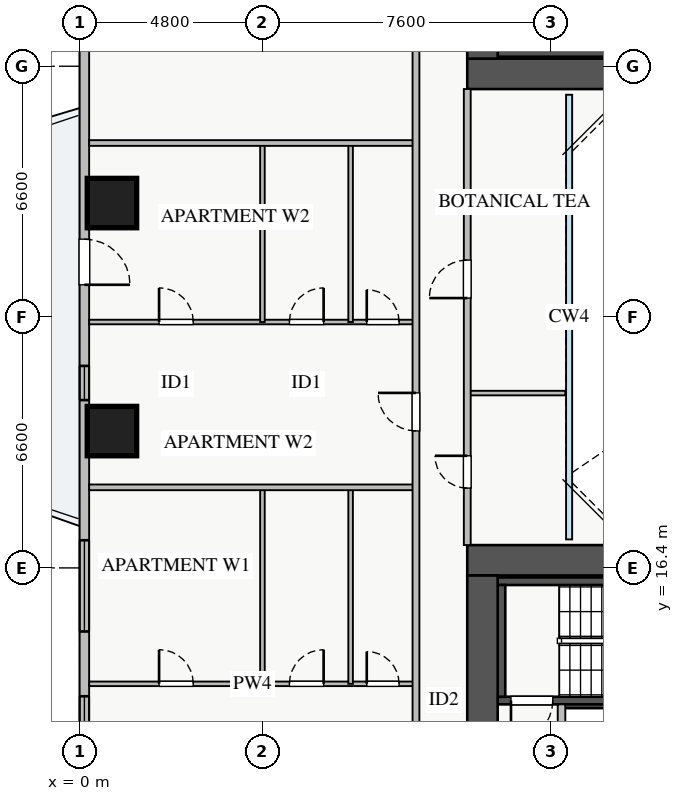
"""IFC4 building model, lengths in metres.
Left out: names, types, materials, properties, quantities, classifications, styles, units other than length and angle.
Written with IfcOpenShell. Run it as: python <this file> out.ifc"""

import sys

from ifc_helpers import new_model, si_unit, direction, frame, frame_2d, origin, origin_2d, place, context, subcontext, project, spatial, rectangle, extrude, source, transform, mapped, element, fill, save


model = new_model("IFC4")
c1 = context("Model", 3, precision=1e-05, world=origin(), true_north=direction((0.0, 1.0)))
c2 = subcontext(c1, "Body", "Model", "MODEL_VIEW")
j1 = project(units=[si_unit("LENGTHUNIT", "METRE"), si_unit("PLANEANGLEUNIT", "RADIAN")], contexts=[c1])
p1 = place(None, origin())
s1 = spatial("IfcSite", under=j1, at=p1, CompositionType="ELEMENT")
p2 = place(p1, origin())
s2 = spatial("IfcBuilding", under=s1, at=p2, CompositionType="ELEMENT")
p3 = place(p2, frame((0.0, 0.0, 32.75)))
s3 = spatial("IfcBuildingStorey", under=s2, at=p3, CompositionType="ELEMENT", Elevation=32.75)
p4 = place(p3, frame((12.68, 12.8, 0.0), z_axis=(0.0, 0.0, 1.0), x_axis=(1.0, 0.0, 0.0)))
e1 = element("IfcWall", 1, at=p4, inside=s3, PredefinedType="SHEAR", context=c2, shape_type="SweptSolid", body=[
    extrude(rectangle(XDim=1.94, YDim=0.18, at=frame_2d((0.97, 0.0))), origin(), (0.0, 0.0, 1.0), 3.07),
])
p5 = place(p3, frame((11.0, 29.95, 0.0), z_axis=(0.0, 0.0, 1.0), x_axis=(1.0, 0.0, 0.0)))
e2 = element("IfcWall", 2, at=p5, inside=s3, PredefinedType="SHEAR", context=c2, shape_type="SweptSolid", body=[
    extrude(rectangle(XDim=7.15, YDim=0.2, at=frame_2d((3.575, 0.0))), origin(), (0.0, 0.0, 1.0), 3.25),
])
p6 = place(p3, frame((11.0, 12.91, 0.0), z_axis=(0.0, 0.0, 1.0), x_axis=(1.0, 0.0, 0.0)))
e3 = element("IfcWall", 3, at=p6, inside=s3, PredefinedType="SHEAR", context=c2, shape_type="SweptSolid", body=[
    extrude(rectangle(XDim=7.15, YDim=0.2, at=frame_2d((3.575, 0.0))), origin(), (0.0, 0.0, 1.0), 3.25),
])
p7 = place(p6, frame((0.35, 0.0, 0.0)))
e4 = element("IfcOpeningElement", 4, at=p7, cuts=e3, PredefinedType="OPENING", context=c2, shape_type="SweptSolid", body=[
    extrude(rectangle(XDim=1.1, YDim=2.05, at=frame_2d((0.55, 1.025))), frame((0.0, 0.11, 0.0), z_axis=(0.0, -1.0, 0.0), x_axis=(1.0, 0.0, 0.0)), (0.0, 0.0, 1.0), 0.22),
])
p8 = place(p3, frame((11.0, 16.05, 0.0), z_axis=(0.0, 0.0, 1.0), x_axis=(1.0, 0.0, 0.0)))
e5 = element("IfcWall", 5, at=p8, inside=s3, PredefinedType="SHEAR", context=c2, shape_type="SweptSolid", body=[
    extrude(rectangle(XDim=7.15, YDim=0.2, at=frame_2d((3.575, 0.0))), origin(), (0.0, 0.0, 1.0), 3.25),
])
p9 = place(p3, frame((11.1, 13.01, 0.0), z_axis=(0.0, 0.0, 1.0), x_axis=(0.0, 1.0, 0.0)))
e6 = element("IfcWall", 6, at=p9, inside=s3, PredefinedType="SHEAR", context=c2, shape_type="SweptSolid", body=[
    extrude(rectangle(XDim=2.94, YDim=0.2, at=frame_2d((1.47, 0.0))), origin(), (0.0, 0.0, 1.0), 3.25),
])
p10 = place(p3, frame((10.2, 29.4, 0.0), z_axis=(0.0, 0.0, 1.0), x_axis=(1.0, 0.0, 0.0)))
e7 = element("IfcWall", 7, at=p10, inside=s3, PredefinedType="SHEAR", context=c2, shape_type="SweptSolid", body=[
    extrude(rectangle(XDim=17.6, YDim=0.8, at=frame_2d((8.8, 0.0))), origin(), (0.0, 0.0, 1.0), 3.25),
])
p11 = place(p3, frame((10.6, 29.8, 0.0), z_axis=(0.0, 0.0, 1.0), x_axis=(0.0, 1.0, 0.0)))
e8 = element("IfcWall", 8, at=p11, inside=s3, PredefinedType="SHEAR", context=c2, shape_type="SweptSolid", body=[
    extrude(rectangle(XDim=5.6, YDim=0.8, at=frame_2d((2.8, 0.0))), origin(), (0.0, 0.0, 1.0), 3.25),
])
p12 = place(p3, frame((10.2, 16.6, 0.0), z_axis=(0.0, 0.0, 1.0), x_axis=(1.0, 0.0, 0.0)))
e9 = element("IfcWall", 9, at=p12, inside=s3, PredefinedType="SHEAR", context=c2, shape_type="SweptSolid", body=[
    extrude(rectangle(XDim=17.6, YDim=0.8, at=frame_2d((8.8, 0.0))), origin(), (0.0, 0.0, 1.0), 3.25),
])
p13 = place(p3, frame((10.6, 10.6, 0.0), z_axis=(0.0, 0.0, 1.0), x_axis=(0.0, 1.0, 0.0)))
e10 = element("IfcWall", 10, at=p13, inside=s3, PredefinedType="SHEAR", context=c2, shape_type="SweptSolid", body=[
    extrude(rectangle(XDim=5.6, YDim=0.8, at=frame_2d((2.8, 0.0))), origin(), (0.0, 0.0, 1.0), 3.25),
])
m1 = source(origin(), c2, "Body", "SweptSolid", [
    extrude(rectangle(XDim=1.3, YDim=1.3, at=origin_2d()), origin(), (0.0, 0.0, 1.0), 3.25),
])
for number, where, z_axis, x_axis in (
    (11, (0.85, 26.0, 0.0), (0.0, 0.0, 1.0), (1.0, 0.0, 0.0)),
    (12, (0.85, 20.0, 0.0), (0.0, 0.0, 1.0), (1.0, 0.0, 0.0)),
):
    element("IfcColumn", number, at=place(p3, frame(where, z_axis=z_axis, x_axis=x_axis)), inside=s3, PredefinedType="COLUMN", context=c2, shape_type="MappedRepresentation", body=[
        mapped(m1, transform((0.0, 0.0, 0.0), x_axis=(1.0, 0.0, 0.0), y_axis=(0.0, 1.0, 0.0), z_axis=(0.0, 0.0, 1.0), scale=1.0)),
    ])
p14 = place(p3, frame((0.125, 9.45, 0.0), z_axis=(0.0, 0.0, 1.0), x_axis=(0.0, 1.0, 0.0)))
e13 = element("IfcWall", 13, at=p14, inside=s3, PredefinedType="STANDARD", context=c2, shape_type="SweptSolid", body=[
    extrude(rectangle(XDim=27.1, YDim=0.25, at=frame_2d((13.55, 0.0))), origin(), (0.0, 0.0, 1.0), 2.61),
])
p15 = place(p14, frame((14.4, 0.0, 0.0)))
e14 = element("IfcOpeningElement", 14, at=p15, cuts=e13, PredefinedType="OPENING", context=c2, shape_type="SweptSolid", body=[
    extrude(rectangle(XDim=1.2, YDim=2.1, at=frame_2d((0.6, 1.05))), frame((0.0, 0.135, 0.0), z_axis=(0.0, -1.0, 0.0), x_axis=(1.0, 0.0, 0.0)), (0.0, 0.0, 1.0), 0.27),
])
p16 = place(p14, frame((1.472, 0.0, 0.9)))
e15 = element("IfcOpeningElement", 15, at=p16, cuts=e13, PredefinedType="OPENING", context=c2, shape_type="SweptSolid", body=[
    extrude(rectangle(XDim=2.1, YDim=1.5, at=frame_2d((1.05, 0.75))), frame((0.0, 0.135, 0.0), z_axis=(0.0, -1.0, 0.0), x_axis=(1.0, 0.0, 0.0)), (0.0, 0.0, 1.0), 0.27),
])
p17 = place(p14, frame((22.663, 0.0, 0.9)))
e16 = element("IfcOpeningElement", 16, at=p17, cuts=e13, PredefinedType="OPENING", context=c2, shape_type="SweptSolid", body=[
    extrude(rectangle(XDim=2.1, YDim=1.48, at=frame_2d((1.05, 0.74))), frame((0.0, 0.135, 0.0), z_axis=(0.0, -1.0, 0.0), x_axis=(1.0, 0.0, 0.0)), (0.0, 0.0, 1.0), 0.27),
])
p18 = place(p14, frame((5.278, 0.0, 0.9)))
e17 = element("IfcOpeningElement", 17, at=p18, cuts=e13, PredefinedType="OPENING", context=c2, shape_type="SweptSolid", body=[
    extrude(rectangle(XDim=2.4, YDim=1.5, at=frame_2d((1.2, 0.75))), frame((0.0, 0.135, 0.0), z_axis=(0.0, -1.0, 0.0), x_axis=(1.0, 0.0, 0.0)), (0.0, 0.0, 1.0), 0.27),
])
p19 = place(p14, frame((11.365, 0.0, 0.9)))
e18 = element("IfcOpeningElement", 18, at=p19, cuts=e13, PredefinedType="OPENING", context=c2, shape_type="SweptSolid", body=[
    extrude(rectangle(XDim=0.9, YDim=1.2, at=frame_2d((0.45, 0.6))), frame((0.0, 0.135, 0.0), z_axis=(0.0, -1.0, 0.0), x_axis=(1.0, 0.0, 0.0)), (0.0, 0.0, 1.0), 0.27),
])
p20 = place(p3, frame((12.68, 10.6, 0.0), z_axis=(0.0, 0.0, 1.0), x_axis=(0.0, 1.0, 0.0)))
e19 = element("IfcWall", 19, at=p20, inside=s3, PredefinedType="PARTITIONING", context=c2, shape_type="SweptSolid", body=[
    extrude(rectangle(XDim=2.21, YDim=0.2, at=frame_2d((1.105, 0.0))), origin(), (0.0, 0.0, 1.0), 3.07),
])
p21 = place(p3, frame((0.25, 13.35, 0.0), z_axis=(0.0, 0.0, 1.0), x_axis=(1.0, 0.0, 0.0)))
e20 = element("IfcWall", 20, at=p21, inside=s3, PredefinedType="PLUMBINGWALL", context=c2, shape_type="SweptSolid", body=[
    extrude(rectangle(XDim=8.6, YDim=0.12, at=frame_2d((4.3, 0.0))), origin(), (0.0, 0.0, 1.0), 3.07),
])
p22 = place(p21, frame((1.84, 0.0, 0.0)))
e21 = element("IfcOpeningElement", 21, at=p22, cuts=e20, PredefinedType="OPENING", context=c2, shape_type="SweptSolid", body=[
    extrude(rectangle(XDim=0.9, YDim=2.05, at=frame_2d((0.45, 1.025))), frame((0.0, 0.07, 0.0), z_axis=(0.0, -1.0, 0.0), x_axis=(1.0, 0.0, 0.0)), (0.0, 0.0, 1.0), 0.14),
])
p23 = place(p21, frame((5.27, 0.0, 0.0)))
e22 = element("IfcOpeningElement", 22, at=p23, cuts=e20, PredefinedType="OPENING", context=c2, shape_type="SweptSolid", body=[
    extrude(rectangle(XDim=0.9, YDim=2.05, at=frame_2d((0.45, 1.025))), frame((0.0, 0.07, 0.0), z_axis=(0.0, -1.0, 0.0), x_axis=(1.0, 0.0, 0.0)), (0.0, 0.0, 1.0), 0.14),
])
p24 = place(p21, frame((7.305, 0.0, 0.0)))
e23 = element("IfcOpeningElement", 23, at=p24, cuts=e20, PredefinedType="OPENING", context=c2, shape_type="SweptSolid", body=[
    extrude(rectangle(XDim=0.85, YDim=2.05, at=frame_2d((0.425, 1.025))), frame((0.0, 0.07, 0.0), z_axis=(0.0, -1.0, 0.0), x_axis=(1.0, 0.0, 0.0)), (0.0, 0.0, 1.0), 0.14),
])
for number, where, z_axis, x_axis in (
    (24, (4.81, 13.35, 0.0), (0.0, 0.0, 1.0), (0.0, 1.0, 0.0)),
    (25, (7.13, 13.35, 0.0), (0.0, 0.0, 1.0), (0.0, 1.0, 0.0)),
):
    element("IfcWall", number, at=place(p3, frame(where, z_axis=z_axis, x_axis=x_axis)), inside=s3, PredefinedType="PLUMBINGWALL", context=c2, shape_type="SweptSolid", body=[
        extrude(rectangle(XDim=5.17, YDim=0.12, at=frame_2d((2.585, 0.0))), origin(), (0.0, 0.0, 1.0), 3.07),
    ])
p25 = place(p3, frame((0.25, 22.87, 0.0), z_axis=(0.0, 0.0, 1.0), x_axis=(1.0, 0.0, 0.0)))
e26 = element("IfcWall", 26, at=p25, inside=s3, PredefinedType="PLUMBINGWALL", context=c2, shape_type="SweptSolid", body=[
    extrude(rectangle(XDim=8.6, YDim=0.12, at=frame_2d((4.3, 0.0))), origin(), (0.0, 0.0, 1.0), 3.07),
])
p26 = place(p25, frame((1.84, 0.0, 0.0)))
e27 = element("IfcOpeningElement", 27, at=p26, cuts=e26, PredefinedType="OPENING", context=c2, shape_type="SweptSolid", body=[
    extrude(rectangle(XDim=0.9, YDim=2.05, at=frame_2d((0.45, 1.025))), frame((0.0, 0.07, 0.0), z_axis=(0.0, -1.0, 0.0), x_axis=(1.0, 0.0, 0.0)), (0.0, 0.0, 1.0), 0.14),
])
p27 = place(p25, frame((5.27, 0.0, 0.0)))
e28 = element("IfcOpeningElement", 28, at=p27, cuts=e26, PredefinedType="OPENING", context=c2, shape_type="SweptSolid", body=[
    extrude(rectangle(XDim=0.9, YDim=2.05, at=frame_2d((0.45, 1.025))), frame((0.0, 0.07, 0.0), z_axis=(0.0, -1.0, 0.0), x_axis=(1.0, 0.0, 0.0)), (0.0, 0.0, 1.0), 0.14),
])
p28 = place(p25, frame((7.305, 0.0, 0.0)))
e29 = element("IfcOpeningElement", 29, at=p28, cuts=e26, PredefinedType="OPENING", context=c2, shape_type="SweptSolid", body=[
    extrude(rectangle(XDim=0.85, YDim=2.05, at=frame_2d((0.425, 1.025))), frame((0.0, 0.07, 0.0), z_axis=(0.0, -1.0, 0.0), x_axis=(1.0, 0.0, 0.0)), (0.0, 0.0, 1.0), 0.14),
])
for number, where, z_axis, x_axis in (
    (30, (4.81, 22.87, 0.0), (0.0, 0.0, 1.0), (0.0, 1.0, 0.0)),
    (31, (7.13, 22.87, 0.0), (0.0, 0.0, 1.0), (0.0, 1.0, 0.0)),
):
    element("IfcWall", number, at=place(p3, frame(where, z_axis=z_axis, x_axis=x_axis)), inside=s3, PredefinedType="PLUMBINGWALL", context=c2, shape_type="SweptSolid", body=[
        extrude(rectangle(XDim=4.71, YDim=0.12, at=frame_2d((2.355, 0.0))), origin(), (0.0, 0.0, 1.0), 3.07),
    ])
for number, where, z_axis, x_axis in (
    (32, (0.25, 18.52, 0.0), (0.0, 0.0, 1.0), (1.0, 0.0, 0.0)),
    (33, (0.25, 27.58, 0.0), (0.0, 0.0, 1.0), (1.0, 0.0, 0.0)),
):
    element("IfcWall", number, at=place(p3, frame(where, z_axis=z_axis, x_axis=x_axis)), inside=s3, PredefinedType="PARTITIONING", context=c2, shape_type="SweptSolid", body=[
        extrude(rectangle(XDim=8.6, YDim=0.15, at=frame_2d((4.3, 0.0))), origin(), (0.0, 0.0, 1.0), 3.07),
    ])
p29 = place(p3, frame((8.85, 7.21, 0.0), z_axis=(0.0, 0.0, 1.0), x_axis=(0.0, 1.0, 0.0)))
e34 = element("IfcWall", 34, at=p29, inside=s3, PredefinedType="PARTITIONING", context=c2, shape_type="SweptSolid", body=[
    extrude(rectangle(XDim=31.23, YDim=0.18, at=frame_2d((15.615, 0.0))), origin(), (0.0, 0.0, 1.0), 3.07),
])
p30 = place(p29, frame((30.09, 0.0, 0.0)))
e35 = element("IfcOpeningElement", 35, at=p30, cuts=e34, PredefinedType="OPENING", context=c2, shape_type="SweptSolid", body=[
    extrude(rectangle(XDim=0.9, YDim=2.05, at=frame_2d((0.45, 1.025))), frame((0.0, 0.1, 0.0), z_axis=(0.0, -1.0, 0.0), x_axis=(1.0, 0.0, 0.0)), (0.0, 0.0, 1.0), 0.2),
])
p31 = place(p29, frame((0.24, 0.0, 0.0)))
e36 = element("IfcOpeningElement", 36, at=p31, cuts=e34, PredefinedType="OPENING", context=c2, shape_type="SweptSolid", body=[
    extrude(rectangle(XDim=0.9, YDim=2.05, at=frame_2d((0.45, 1.025))), frame((0.0, 0.1, 0.0), z_axis=(0.0, -1.0, 0.0), x_axis=(1.0, 0.0, 0.0)), (0.0, 0.0, 1.0), 0.2),
])
p32 = place(p29, frame((3.06, 0.0, 0.0)))
e37 = element("IfcOpeningElement", 37, at=p32, cuts=e34, PredefinedType="OPENING", context=c2, shape_type="SweptSolid", body=[
    extrude(rectangle(XDim=1.0, YDim=2.05, at=frame_2d((0.5, 1.025))), frame((0.0, 0.1, 0.0), z_axis=(0.0, -1.0, 0.0), x_axis=(1.0, 0.0, 0.0)), (0.0, 0.0, 1.0), 0.2),
])
p33 = place(p29, frame((12.795, 0.0, 0.0)))
e38 = element("IfcOpeningElement", 38, at=p33, cuts=e34, PredefinedType="OPENING", context=c2, shape_type="SweptSolid", body=[
    extrude(rectangle(XDim=1.0, YDim=2.05, at=frame_2d((0.5, 1.025))), frame((0.0, 0.1, 0.0), z_axis=(0.0, -1.0, 0.0), x_axis=(1.0, 0.0, 0.0)), (0.0, 0.0, 1.0), 0.2),
])
p34 = place(p29, frame((24.62, 0.0, 0.0)))
e39 = element("IfcOpeningElement", 39, at=p34, cuts=e34, PredefinedType="OPENING", context=c2, shape_type="SweptSolid", body=[
    extrude(rectangle(XDim=1.0, YDim=2.05, at=frame_2d((0.5, 1.025))), frame((0.0, 0.1, 0.0), z_axis=(0.0, -1.0, 0.0), x_axis=(1.0, 0.0, 0.0)), (0.0, 0.0, 1.0), 0.2),
])
p35 = place(p3, frame((10.2, 21.0, 0.0), z_axis=(0.0, 0.0, 1.0), x_axis=(1.0, 0.0, 0.0)))
e40 = element("IfcWall", 40, at=p35, inside=s3, PredefinedType="PLUMBINGWALL", context=c2, shape_type="SweptSolid", body=[
    extrude(rectangle(XDim=2.58, YDim=0.12, at=frame_2d((1.29, 0.0))), origin(), (0.0, 0.0, 1.0), 3.07),
])
p36 = place(p3, frame((10.2, 17.0, 0.0), z_axis=(0.0, 0.0, 1.0), x_axis=(0.0, 1.0, 0.0)))
e41 = element("IfcWall", 41, at=p36, inside=s3, PredefinedType="PARTITIONING", context=c2, shape_type="SweptSolid", body=[
    extrude(rectangle(XDim=12.0, YDim=0.18, at=frame_2d((6.0, 0.0))), origin(), (0.0, 0.0, 1.0), 3.07),
])
p37 = place(p36, frame((1.5, 0.0, 0.0)))
e42 = element("IfcOpeningElement", 42, at=p37, cuts=e41, PredefinedType="OPENING", context=c2, shape_type="SweptSolid", body=[
    extrude(rectangle(XDim=0.85, YDim=2.05, at=frame_2d((0.425, 1.025))), frame((0.0, 0.1, 0.0), z_axis=(0.0, -1.0, 0.0), x_axis=(1.0, 0.0, 0.0)), (0.0, 0.0, 1.0), 0.2),
])
p38 = place(p36, frame((6.5, 0.0, 0.0)))
e43 = element("IfcOpeningElement", 43, at=p38, cuts=e41, PredefinedType="OPENING", context=c2, shape_type="SweptSolid", body=[
    extrude(rectangle(XDim=1.0, YDim=2.05, at=frame_2d((0.5, 1.025))), frame((0.0, 0.1, 0.0), z_axis=(0.0, -1.0, 0.0), x_axis=(1.0, 0.0, 0.0)), (0.0, 0.0, 1.0), 0.2),
])
m2 = source(origin(), c2, "Body", "SweptSolid", [
    extrude(rectangle(XDim=1.2, YDim=2.1, at=frame_2d((0.6, 1.05))), frame((0.0, 0.025, 0.0), z_axis=(0.0, -1.0, 0.0), x_axis=(1.0, 0.0, 0.0)), (0.0, 0.0, 1.0), 0.05),
])
p39 = place(p15, frame((1.2, 0.0, 0.0), z_axis=(0.0, 0.0, 1.0), x_axis=(-1.0, 0.0, 0.0)))
e44 = element("IfcDoor", 44, at=p39, inside=s3, OperationType="SINGLE_SWING_LEFT", PredefinedType="DOOR", context=c2, shape_type="MappedRepresentation", body=[
    mapped(m2, transform((0.0, 0.0, 0.0), x_axis=(1.0, 0.0, 0.0), y_axis=(0.0, 1.0, 0.0), z_axis=(0.0, 0.0, 1.0), scale=1.0)),
])
fill(e14, e44)
m3 = source(origin(), c2, "Body", "SweptSolid", [
    extrude(rectangle(XDim=2.1, YDim=1.5, at=frame_2d((1.05, 0.75))), frame((0.0, 0.03, 0.0), z_axis=(0.0, -1.0, 0.0), x_axis=(1.0, 0.0, 0.0)), (0.0, 0.0, 1.0), 0.06),
])
p40 = place(p16, origin())
e45 = element("IfcWindow", 45, at=p40, inside=s3, PartitioningType="TRIPLE_PANEL_VERTICAL", PredefinedType="WINDOW", context=c2, shape_type="MappedRepresentation", body=[
    mapped(m3, transform((0.0, 0.0, 0.0), x_axis=(1.0, 0.0, 0.0), y_axis=(0.0, 1.0, 0.0), z_axis=(0.0, 0.0, 1.0), scale=1.0)),
])
fill(e15, e45)
m4 = source(origin(), c2, "Body", "SweptSolid", [
    extrude(rectangle(XDim=1.1, YDim=2.05, at=frame_2d((0.55, 1.025))), frame((0.0, 0.025, 0.0), z_axis=(0.0, -1.0, 0.0), x_axis=(1.0, 0.0, 0.0)), (0.0, 0.0, 1.0), 0.05),
])
p41 = place(p7, frame((1.1, 0.0, 0.0), z_axis=(0.0, 0.0, 1.0), x_axis=(-1.0, 0.0, 0.0)))
e46 = element("IfcDoor", 46, at=p41, inside=s3, OperationType="SINGLE_SWING_LEFT", PredefinedType="DOOR", context=c2, shape_type="MappedRepresentation", body=[
    mapped(m4, transform((0.0, 0.0, 0.0), x_axis=(1.0, 0.0, 0.0), y_axis=(0.0, 1.0, 0.0), z_axis=(0.0, 0.0, 1.0), scale=1.0)),
])
fill(e4, e46)
m5 = source(origin(), c2, "Body", "SweptSolid", [
    extrude(rectangle(XDim=0.9, YDim=2.05, at=frame_2d((0.45, 1.025))), frame((0.0, 0.025, 0.0), z_axis=(0.0, -1.0, 0.0), x_axis=(1.0, 0.0, 0.0)), (0.0, 0.0, 1.0), 0.05),
])
p42 = place(p22, origin())
e47 = element("IfcDoor", 47, at=p42, inside=s3, OperationType="SINGLE_SWING_LEFT", PredefinedType="DOOR", context=c2, shape_type="MappedRepresentation", body=[
    mapped(m5, transform((0.0, 0.0, 0.0), x_axis=(1.0, 0.0, 0.0), y_axis=(0.0, 1.0, 0.0), z_axis=(0.0, 0.0, 1.0), scale=1.0)),
])
fill(e21, e47)
p43 = place(p23, origin())
e48 = element("IfcDoor", 48, at=p43, inside=s3, OperationType="SINGLE_SWING_RIGHT", PredefinedType="DOOR", context=c2, shape_type="MappedRepresentation", body=[
    mapped(m5, transform((0.0, 0.0, 0.0), x_axis=(1.0, 0.0, 0.0), y_axis=(0.0, 1.0, 0.0), z_axis=(0.0, 0.0, 1.0), scale=1.0)),
])
fill(e22, e48)
m6 = source(origin(), c2, "Body", "SweptSolid", [
    extrude(rectangle(XDim=0.85, YDim=2.05, at=frame_2d((0.425, 1.025))), frame((0.0, 0.025, 0.0), z_axis=(0.0, -1.0, 0.0), x_axis=(1.0, 0.0, 0.0)), (0.0, 0.0, 1.0), 0.05),
])
p44 = place(p24, origin())
e49 = element("IfcDoor", 49, at=p44, inside=s3, OperationType="SINGLE_SWING_LEFT", PredefinedType="DOOR", context=c2, shape_type="MappedRepresentation", body=[
    mapped(m6, transform((0.0, 0.0, 0.0), x_axis=(1.0, 0.0, 0.0), y_axis=(0.0, 1.0, 0.0), z_axis=(0.0, 0.0, 1.0), scale=1.0)),
])
fill(e23, e49)
p45 = place(p26, origin())
e50 = element("IfcDoor", 50, at=p45, inside=s3, OperationType="SINGLE_SWING_LEFT", PredefinedType="DOOR", context=c2, shape_type="MappedRepresentation", body=[
    mapped(m5, transform((0.0, 0.0, 0.0), x_axis=(1.0, 0.0, 0.0), y_axis=(0.0, 1.0, 0.0), z_axis=(0.0, 0.0, 1.0), scale=1.0)),
])
fill(e27, e50)
p46 = place(p27, origin())
e51 = element("IfcDoor", 51, at=p46, inside=s3, OperationType="SINGLE_SWING_RIGHT", PredefinedType="DOOR", context=c2, shape_type="MappedRepresentation", body=[
    mapped(m5, transform((0.0, 0.0, 0.0), x_axis=(1.0, 0.0, 0.0), y_axis=(0.0, 1.0, 0.0), z_axis=(0.0, 0.0, 1.0), scale=1.0)),
])
fill(e28, e51)
p47 = place(p28, origin())
e52 = element("IfcDoor", 52, at=p47, inside=s3, OperationType="SINGLE_SWING_LEFT", PredefinedType="DOOR", context=c2, shape_type="MappedRepresentation", body=[
    mapped(m6, transform((0.0, 0.0, 0.0), x_axis=(1.0, 0.0, 0.0), y_axis=(0.0, 1.0, 0.0), z_axis=(0.0, 0.0, 1.0), scale=1.0)),
])
fill(e29, e52)
m7 = source(origin(), c2, "Body", "SweptSolid", [
    extrude(rectangle(XDim=1.0, YDim=2.05, at=frame_2d((0.5, 1.025))), frame((0.0, 0.025, 0.0), z_axis=(0.0, -1.0, 0.0), x_axis=(1.0, 0.0, 0.0)), (0.0, 0.0, 1.0), 0.05),
])
p48 = place(p33, origin())
e53 = element("IfcDoor", 53, at=p48, inside=s3, OperationType="SINGLE_SWING_RIGHT", PredefinedType="DOOR", context=c2, shape_type="MappedRepresentation", body=[
    mapped(m7, transform((0.0, 0.0, 0.0), x_axis=(1.0, 0.0, 0.0), y_axis=(0.0, 1.0, 0.0), z_axis=(0.0, 0.0, 1.0), scale=1.0)),
])
fill(e38, e53)
p49 = place(p37, origin())
e54 = element("IfcDoor", 54, at=p49, inside=s3, OperationType="SINGLE_SWING_RIGHT", PredefinedType="DOOR", context=c2, shape_type="MappedRepresentation", body=[
    mapped(m6, transform((0.0, 0.0, 0.0), x_axis=(1.0, 0.0, 0.0), y_axis=(0.0, 1.0, 0.0), z_axis=(0.0, 0.0, 1.0), scale=1.0)),
])
fill(e42, e54)
p50 = place(p38, origin())
e55 = element("IfcDoor", 55, at=p50, inside=s3, OperationType="SINGLE_SWING_LEFT", PredefinedType="DOOR", context=c2, shape_type="MappedRepresentation", body=[
    mapped(m7, transform((0.0, 0.0, 0.0), x_axis=(1.0, 0.0, 0.0), y_axis=(0.0, 1.0, 0.0), z_axis=(0.0, 0.0, 1.0), scale=1.0)),
])
fill(e43, e55)
m8 = source(origin(), c2, "Body", "SweptSolid", [
    extrude(rectangle(XDim=2.4, YDim=1.5, at=frame_2d((1.2, 0.75))), frame((0.0, 0.03, 0.0), z_axis=(0.0, -1.0, 0.0), x_axis=(1.0, 0.0, 0.0)), (0.0, 0.0, 1.0), 0.06),
])
p51 = place(p18, origin())
e56 = element("IfcWindow", 56, at=p51, inside=s3, PartitioningType="TRIPLE_PANEL_VERTICAL", PredefinedType="WINDOW", context=c2, shape_type="MappedRepresentation", body=[
    mapped(m8, transform((0.0, 0.0, 0.0), x_axis=(1.0, 0.0, 0.0), y_axis=(0.0, 1.0, 0.0), z_axis=(0.0, 0.0, 1.0), scale=1.0)),
])
fill(e17, e56)
m9 = source(origin(), c2, "Body", "SweptSolid", [
    extrude(rectangle(XDim=0.9, YDim=1.2, at=frame_2d((0.45, 0.6))), frame((0.0, 0.03, 0.0), z_axis=(0.0, -1.0, 0.0), x_axis=(1.0, 0.0, 0.0)), (0.0, 0.0, 1.0), 0.06),
])
p52 = place(p19, origin())
e57 = element("IfcWindow", 57, at=p52, inside=s3, PartitioningType="SINGLE_PANEL", PredefinedType="WINDOW", context=c2, shape_type="MappedRepresentation", body=[
    mapped(m9, transform((0.0, 0.0, 0.0), x_axis=(1.0, 0.0, 0.0), y_axis=(0.0, 1.0, 0.0), z_axis=(0.0, 0.0, 1.0), scale=1.0)),
])
fill(e18, e57)
save(model, sys.argv[1])
